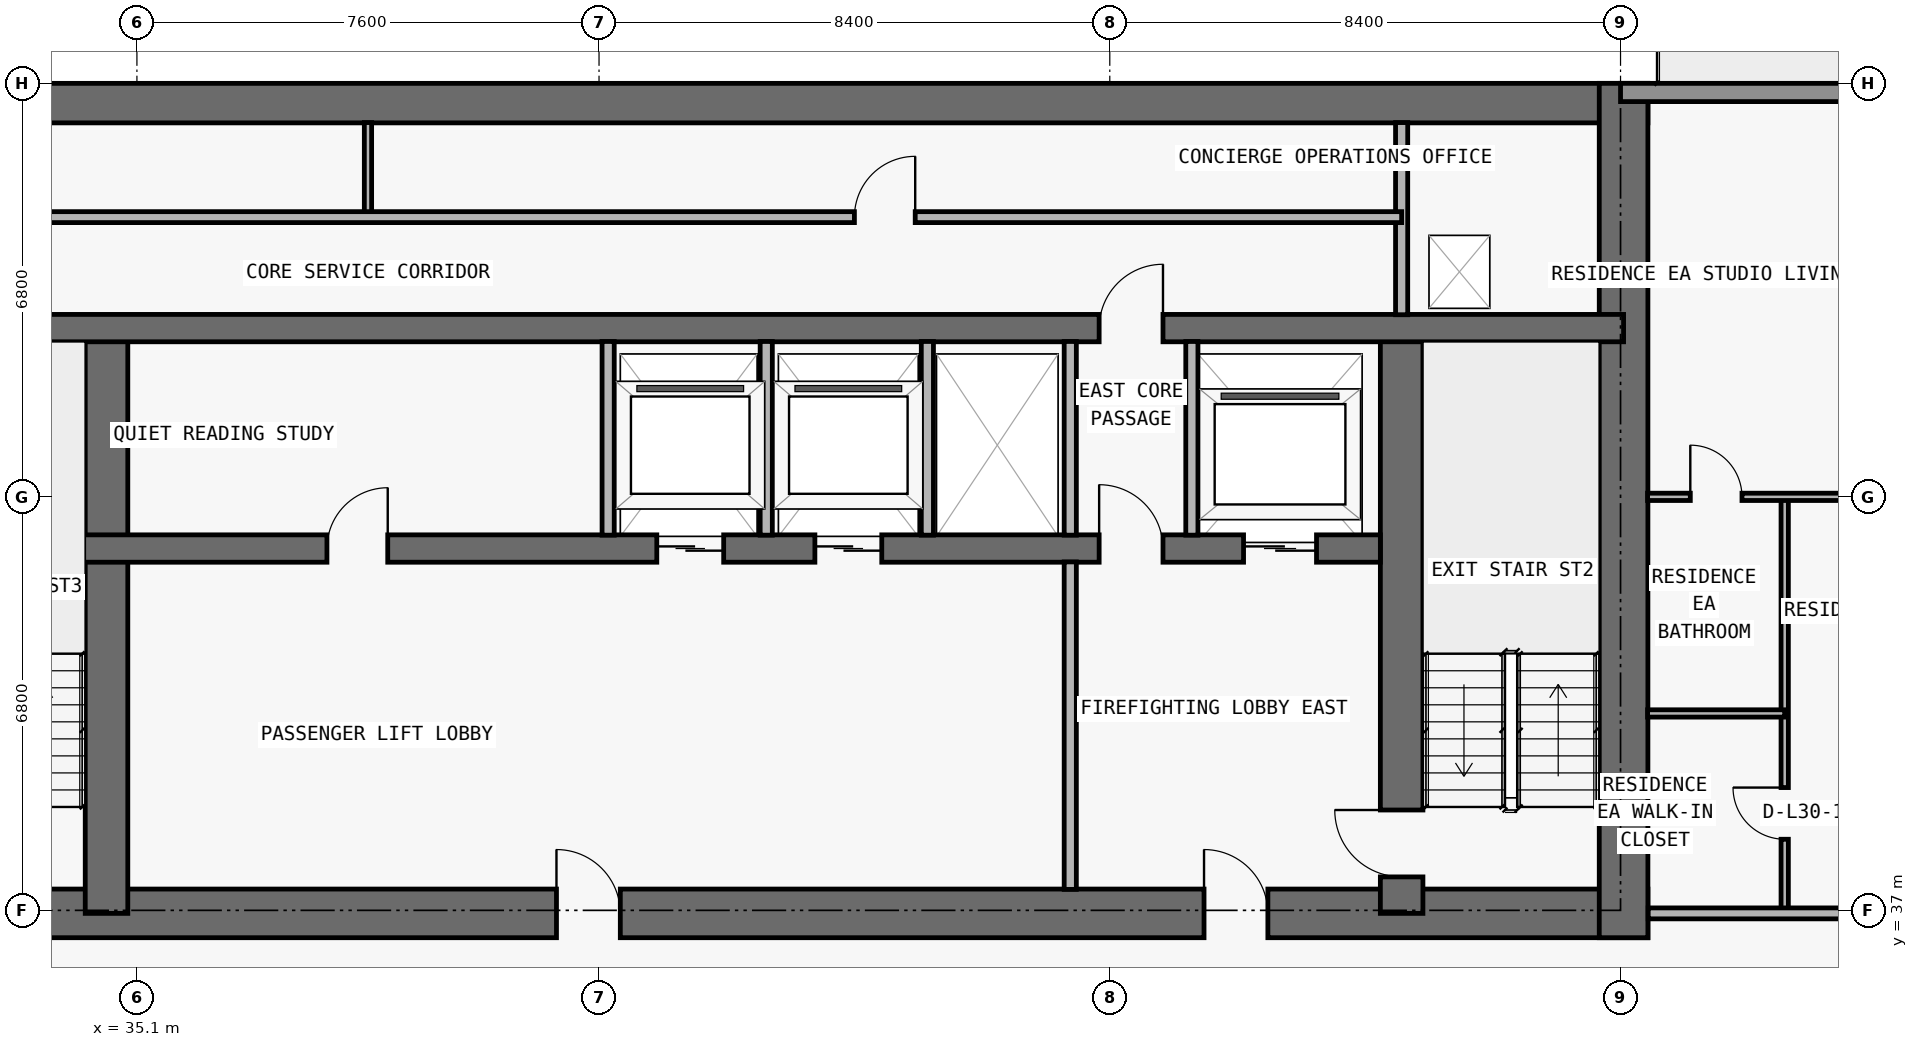
"""IFC4 building model, lengths in metres.
Left out: names, types, materials, properties, quantities, classifications, styles, units other than length and angle.
Written with IfcOpenShell. Run it as: python <this file> out.ifc"""

import sys

from ifc_helpers import new_model, si_unit, direction, frame, frame_2d, origin, place, context, subcontext, project, spatial, rectangle, extrude, element, fill, save


model = new_model("IFC4")
c1 = context("Model", 3, precision=1e-05, world=origin(), true_north=direction((0.0, 1.0)))
c2 = subcontext(c1, "Body", "Model", "MODEL_VIEW")
j1 = project(units=[si_unit("LENGTHUNIT", "METRE"), si_unit("PLANEANGLEUNIT", "RADIAN")], contexts=[c1])
p1 = place(None, origin())
s1 = spatial("IfcSite", under=j1, at=p1, CompositionType="ELEMENT")
p2 = place(p1, origin())
s2 = spatial("IfcBuilding", under=s1, at=p2, CompositionType="ELEMENT")
p3 = place(p2, frame((0.0, 0.0, 112.5)))
s3 = spatial("IfcBuildingStorey", under=s2, at=p3, CompositionType="ELEMENT", Elevation=112.5)
p4 = place(p3, frame((17.85, 36.95, 0.0), z_axis=(0.0, 0.0, 1.0), x_axis=(1.0, 0.0, 0.0)))
e1 = element("IfcWall", 1, at=p4, inside=s3, PredefinedType="SHEAR", context=c2, shape_type="SweptSolid", body=[
    extrude(rectangle(XDim=42.1, YDim=0.8, at=frame_2d((21.05, 0.0))), origin(), (0.0, 0.0, 1.0), 3.05),
])
p5 = place(p4, frame((14.45, 0.0, 0.0)))
e2 = element("IfcOpeningElement", 2, at=p5, cuts=e1, PredefinedType="OPENING", context=c2, shape_type="SweptSolid", body=[
    extrude(rectangle(XDim=1.1, YDim=2.15, at=frame_2d((0.55, 1.075))), frame((0.0, 0.41, 0.0), z_axis=(0.0, -1.0, 0.0), x_axis=(1.0, 0.0, 0.0)), (0.0, 0.0, 1.0), 0.82),
])
p6 = place(p4, frame((6.3, 0.0, 0.0)))
e3 = element("IfcOpeningElement", 3, at=p6, cuts=e1, PredefinedType="OPENING", context=c2, shape_type="SweptSolid", body=[
    extrude(rectangle(XDim=1.05, YDim=2.15, at=frame_2d((0.525, 1.075))), frame((0.0, 0.41, 0.0), z_axis=(0.0, -1.0, 0.0), x_axis=(1.0, 0.0, 0.0)), (0.0, 0.0, 1.0), 0.82),
])
p7 = place(p4, frame((34.8, 0.0, 0.0)))
e4 = element("IfcOpeningElement", 4, at=p7, cuts=e1, PredefinedType="OPENING", context=c2, shape_type="SweptSolid", body=[
    extrude(rectangle(XDim=1.05, YDim=2.15, at=frame_2d((0.525, 1.075))), frame((0.0, 0.41, 0.0), z_axis=(0.0, -1.0, 0.0), x_axis=(1.0, 0.0, 0.0)), (0.0, 0.0, 1.0), 0.82),
])
p8 = place(p4, frame((10.913, 0.0, 0.0)))
e5 = element("IfcOpeningElement", 5, at=p8, cuts=e1, PredefinedType="OPENING", context=c2, shape_type="SweptSolid", body=[
    extrude(rectangle(XDim=1.05, YDim=2.15, at=frame_2d((0.525, 1.075))), frame((0.0, 0.41, 0.0), z_axis=(0.0, -1.0, 0.0), x_axis=(1.0, 0.0, 0.0)), (0.0, 0.0, 1.0), 0.82),
])
p9 = place(p4, frame((24.15, 0.0, 0.0)))
e6 = element("IfcOpeningElement", 6, at=p9, cuts=e1, PredefinedType="OPENING", context=c2, shape_type="SweptSolid", body=[
    extrude(rectangle(XDim=1.05, YDim=2.15, at=frame_2d((0.525, 1.075))), frame((0.0, 0.41, 0.0), z_axis=(0.0, -1.0, 0.0), x_axis=(1.0, 0.0, 0.0)), (0.0, 0.0, 1.0), 0.82),
])
p10 = place(p3, frame((17.85, 50.275, 0.0), z_axis=(0.0, 0.0, 1.0), x_axis=(1.0, 0.0, 0.0)))
e7 = element("IfcWall", 7, at=p10, inside=s3, PredefinedType="SHEAR", context=c2, shape_type="SweptSolid", body=[
    extrude(rectangle(XDim=42.1, YDim=0.65, at=frame_2d((21.05, 0.0))), origin(), (0.0, 0.0, 1.0), 3.05),
])
p11 = place(p3, frame((59.55, 36.55, 0.0), z_axis=(0.0, 0.0, 1.0), x_axis=(0.0, 1.0, 0.0)))
e8 = element("IfcWall", 8, at=p11, inside=s3, PredefinedType="SHEAR", context=c2, shape_type="SweptSolid", body=[
    extrude(rectangle(XDim=14.05, YDim=0.8, at=frame_2d((7.025, 0.0))), origin(), (0.0, 0.0, 1.0), 3.05),
])
p12 = place(p3, frame((55.9, 36.95, 0.0), z_axis=(0.0, 0.0, 1.0), x_axis=(0.0, 1.0, 0.0)))
e9 = element("IfcWall", 9, at=p12, inside=s3, PredefinedType="SHEAR", context=c2, shape_type="SweptSolid", body=[
    extrude(rectangle(XDim=9.625, YDim=0.7, at=frame_2d((4.812, 0.0))), origin(), (0.0, 0.0, 1.0), 3.05),
])
p13 = place(p12, frame((0.6, 0.0, 0.0)))
e10 = element("IfcOpeningElement", 10, at=p13, cuts=e9, PredefinedType="OPENING", context=c2, shape_type="SweptSolid", body=[
    extrude(rectangle(XDim=1.1, YDim=2.15, at=frame_2d((0.55, 1.075))), frame((0.0, 0.36, 0.0), z_axis=(0.0, -1.0, 0.0), x_axis=(1.0, 0.0, 0.0)), (0.0, 0.0, 1.0), 0.72),
])
p14 = place(p3, frame((34.6, 36.95, 0.0), z_axis=(0.0, 0.0, 1.0), x_axis=(0.0, 1.0, 0.0)))
e11 = element("IfcWall", 11, at=p14, inside=s3, PredefinedType="SHEAR", context=c2, shape_type="SweptSolid", body=[
    extrude(rectangle(XDim=9.625, YDim=0.7, at=frame_2d((4.812, 0.0))), origin(), (0.0, 0.0, 1.0), 3.05),
])
p15 = place(p3, frame((22.25, 42.95, 0.0), z_axis=(0.0, 0.0, 1.0), x_axis=(1.0, 0.0, 0.0)))
e12 = element("IfcWall", 12, at=p15, inside=s3, PredefinedType="SHEAR", context=c2, shape_type="SweptSolid", body=[
    extrude(rectangle(XDim=33.3, YDim=0.45, at=frame_2d((16.65, 0.0))), origin(), (0.0, 0.0, 1.0), 3.05),
])
p16 = place(p15, frame((1.05, 0.0, 0.0)))
e13 = element("IfcOpeningElement", 13, at=p16, cuts=e12, PredefinedType="OPENING", context=c2, shape_type="SweptSolid", body=[
    extrude(rectangle(XDim=1.2, YDim=2.2, at=frame_2d((0.6, 1.1))), frame((0.0, 0.235, 0.0), z_axis=(0.0, -1.0, 0.0), x_axis=(1.0, 0.0, 0.0)), (0.0, 0.0, 1.0), 0.47),
])
p17 = place(p15, frame((31.05, 0.0, 0.0)))
e14 = element("IfcOpeningElement", 14, at=p17, cuts=e12, PredefinedType="OPENING", context=c2, shape_type="SweptSolid", body=[
    extrude(rectangle(XDim=1.2, YDim=2.2, at=frame_2d((0.6, 1.1))), frame((0.0, 0.235, 0.0), z_axis=(0.0, -1.0, 0.0), x_axis=(1.0, 0.0, 0.0)), (0.0, 0.0, 1.0), 0.47),
])
p18 = place(p15, frame((21.4, 0.0, 0.0)))
e15 = element("IfcOpeningElement", 15, at=p18, cuts=e12, PredefinedType="OPENING", context=c2, shape_type="SweptSolid", body=[
    extrude(rectangle(XDim=1.1, YDim=2.2, at=frame_2d((0.55, 1.1))), frame((0.0, 0.235, 0.0), z_axis=(0.0, -1.0, 0.0), x_axis=(1.0, 0.0, 0.0)), (0.0, 0.0, 1.0), 0.47),
])
p19 = place(p15, frame((24.0, 0.0, 0.0)))
e16 = element("IfcOpeningElement", 16, at=p19, cuts=e12, PredefinedType="OPENING", context=c2, shape_type="SweptSolid", body=[
    extrude(rectangle(XDim=1.1, YDim=2.2, at=frame_2d((0.55, 1.1))), frame((0.0, 0.235, 0.0), z_axis=(0.0, -1.0, 0.0), x_axis=(1.0, 0.0, 0.0)), (0.0, 0.0, 1.0), 0.47),
])
p20 = place(p15, frame((3.625, 0.0, 0.0)))
e17 = element("IfcOpeningElement", 17, at=p20, cuts=e12, PredefinedType="OPENING", context=c2, shape_type="SweptSolid", body=[
    extrude(rectangle(XDim=1.05, YDim=2.15, at=frame_2d((0.525, 1.075))), frame((0.0, 0.235, 0.0), z_axis=(0.0, -1.0, 0.0), x_axis=(1.0, 0.0, 0.0)), (0.0, 0.0, 1.0), 0.47),
])
p21 = place(p15, frame((28.675, 0.0, 0.0)))
e18 = element("IfcOpeningElement", 18, at=p21, cuts=e12, PredefinedType="OPENING", context=c2, shape_type="SweptSolid", body=[
    extrude(rectangle(XDim=1.05, YDim=2.15, at=frame_2d((0.525, 1.075))), frame((0.0, 0.235, 0.0), z_axis=(0.0, -1.0, 0.0), x_axis=(1.0, 0.0, 0.0)), (0.0, 0.0, 1.0), 0.47),
])
p22 = place(p15, frame((15.975, 0.0, 0.0)))
e19 = element("IfcOpeningElement", 19, at=p22, cuts=e12, PredefinedType="OPENING", context=c2, shape_type="SweptSolid", body=[
    extrude(rectangle(XDim=1.0, YDim=2.2, at=frame_2d((0.5, 1.1))), frame((0.0, 0.235, 0.0), z_axis=(0.0, -1.0, 0.0), x_axis=(1.0, 0.0, 0.0)), (0.0, 0.0, 1.0), 0.47),
])
p23 = place(p3, frame((18.25, 46.575, 0.0), z_axis=(0.0, 0.0, 1.0), x_axis=(1.0, 0.0, 0.0)))
e20 = element("IfcWall", 20, at=p23, inside=s3, PredefinedType="SHEAR", context=c2, shape_type="SweptSolid", body=[
    extrude(rectangle(XDim=41.3, YDim=0.45, at=frame_2d((20.65, 0.0))), origin(), (0.0, 0.0, 1.0), 3.05),
])
p24 = place(p23, frame((7.625, 0.0, 0.0)))
e21 = element("IfcOpeningElement", 21, at=p24, cuts=e20, PredefinedType="OPENING", context=c2, shape_type="SweptSolid", body=[
    extrude(rectangle(XDim=1.05, YDim=2.15, at=frame_2d((0.525, 1.075))), frame((0.0, 0.235, 0.0), z_axis=(0.0, -1.0, 0.0), x_axis=(1.0, 0.0, 0.0)), (0.0, 0.0, 1.0), 0.47),
])
p25 = place(p23, frame((32.675, 0.0, 0.0)))
e22 = element("IfcOpeningElement", 22, at=p25, cuts=e20, PredefinedType="OPENING", context=c2, shape_type="SweptSolid", body=[
    extrude(rectangle(XDim=1.05, YDim=2.15, at=frame_2d((0.525, 1.075))), frame((0.0, 0.235, 0.0), z_axis=(0.0, -1.0, 0.0), x_axis=(1.0, 0.0, 0.0)), (0.0, 0.0, 1.0), 0.47),
])
p26 = place(p3, frame((59.5, 50.45, 0.0), z_axis=(0.0, 0.0, 1.0), x_axis=(1.0, 0.0, 0.0)))
e23 = element("IfcWall", 23, at=p26, inside=s3, PredefinedType="STANDARD", context=c2, shape_type="SweptSolid", body=[
    extrude(rectangle(XDim=10.6, YDim=0.3, at=frame_2d((5.3, 0.0))), origin(), (0.0, 0.0, 1.0), 3.05),
])
p27 = place(p26, frame((4.3, 0.0, 0.0)))
e24 = element("IfcOpeningElement", 24, at=p27, cuts=e23, PredefinedType="OPENING", context=c2, shape_type="SweptSolid", body=[
    extrude(rectangle(XDim=2.0, YDim=2.3, at=frame_2d((1.0, 1.15))), frame((0.0, 0.16, 0.0), z_axis=(0.0, -1.0, 0.0), x_axis=(1.0, 0.0, 0.0)), (0.0, 0.0, 1.0), 0.32),
])
p28 = place(p3, frame((38.9, 48.4, 0.0), z_axis=(0.0, 0.0, 1.0), x_axis=(0.0, 1.0, 0.0)))
e25 = element("IfcWall", 25, at=p28, inside=s3, PredefinedType="PARTITIONING", context=c2, shape_type="SweptSolid", body=[
    extrude(rectangle(XDim=1.555, YDim=0.12, at=frame_2d((0.778, 0.0))), origin(), (0.0, 0.0, 1.0), 3.05),
])
for number, where, z_axis, x_axis in (
    (26, (42.85, 43.17, 0.0), (0.0, 0.0, 1.0), (0.0, 1.0, 0.0)),
    (27, (45.45, 43.17, 0.0), (0.0, 0.0, 1.0), (0.0, 1.0, 0.0)),
    (28, (48.1, 43.17, 0.0), (0.0, 0.0, 1.0), (0.0, 1.0, 0.0)),
):
    element("IfcWall", number, at=place(p3, frame(where, z_axis=z_axis, x_axis=x_axis)), inside=s3, PredefinedType="PARTITIONING", context=c2, shape_type="SweptSolid", body=[
        extrude(rectangle(XDim=3.185, YDim=0.2, at=frame_2d((1.593, 0.0))), origin(), (0.0, 0.0, 1.0), 3.05),
    ])
p29 = place(p3, frame((50.45, 37.345, 0.0), z_axis=(0.0, 0.0, 1.0), x_axis=(0.0, 1.0, 0.0)))
e29 = element("IfcWall", 29, at=p29, inside=s3, PredefinedType="PARTITIONING", context=c2, shape_type="SweptSolid", body=[
    extrude(rectangle(XDim=5.385, YDim=0.2, at=frame_2d((2.692, 0.0))), origin(), (0.0, 0.0, 1.0), 3.05),
])
for number, where, z_axis, x_axis in (
    (30, (50.45, 43.17, 0.0), (0.0, 0.0, 1.0), (0.0, 1.0, 0.0)),
    (31, (52.45, 43.17, 0.0), (0.0, 0.0, 1.0), (0.0, 1.0, 0.0)),
):
    element("IfcWall", number, at=place(p3, frame(where, z_axis=z_axis, x_axis=x_axis)), inside=s3, PredefinedType="PARTITIONING", context=c2, shape_type="SweptSolid", body=[
        extrude(rectangle(XDim=3.185, YDim=0.2, at=frame_2d((1.593, 0.0))), origin(), (0.0, 0.0, 1.0), 3.05),
    ])
p30 = place(p3, frame((55.9, 46.795, 0.0), z_axis=(0.0, 0.0, 1.0), x_axis=(0.0, 1.0, 0.0)))
e32 = element("IfcWall", 32, at=p30, inside=s3, PredefinedType="PARTITIONING", context=c2, shape_type="SweptSolid", body=[
    extrude(rectangle(XDim=3.16, YDim=0.2, at=frame_2d((1.58, 0.0))), origin(), (0.0, 0.0, 1.0), 3.05),
])
p31 = place(p3, frame((62.2, 36.95, 0.0), z_axis=(0.0, 0.0, 1.0), x_axis=(0.0, 1.0, 0.0)))
e33 = element("IfcWall", 33, at=p31, inside=s3, PredefinedType="PARTITIONING", context=c2, shape_type="SweptSolid", body=[
    extrude(rectangle(XDim=6.85, YDim=0.12, at=frame_2d((3.425, 0.0))), origin(), (0.0, 0.0, 1.0), 3.05),
])
p32 = place(p31, frame((1.219, 0.0, 0.0)))
e34 = element("IfcOpeningElement", 34, at=p32, cuts=e33, PredefinedType="OPENING", context=c2, shape_type="SweptSolid", body=[
    extrude(rectangle(XDim=0.85, YDim=2.1, at=frame_2d((0.425, 1.05))), frame((0.0, 0.07, 0.0), z_axis=(0.0, -1.0, 0.0), x_axis=(1.0, 0.0, 0.0)), (0.0, 0.0, 1.0), 0.14),
])
p33 = place(p3, frame((59.955, 36.95, 0.0), z_axis=(0.0, 0.0, 1.0), x_axis=(1.0, 0.0, 0.0)))
e35 = element("IfcWall", 35, at=p33, inside=s3, PredefinedType="PARTITIONING", context=c2, shape_type="SweptSolid", body=[
    extrude(rectangle(XDim=10.145, YDim=0.18, at=frame_2d((5.073, 0.0))), origin(), (0.0, 0.0, 1.0), 3.05),
])
p34 = place(p33, frame((3.957, 0.0, 0.0)))
e36 = element("IfcOpeningElement", 36, at=p34, cuts=e35, PredefinedType="OPENING", context=c2, shape_type="SweptSolid", body=[
    extrude(rectangle(XDim=1.0, YDim=2.2, at=frame_2d((0.5, 1.1))), frame((0.0, 0.1, 0.0), z_axis=(0.0, -1.0, 0.0), x_axis=(1.0, 0.0, 0.0)), (0.0, 0.0, 1.0), 0.2),
])
p35 = place(p3, frame((59.945, 40.238, 0.0), z_axis=(0.0, 0.0, 1.0), x_axis=(1.0, 0.0, 0.0)))
e37 = element("IfcWall", 37, at=p35, inside=s3, PredefinedType="PARTITIONING", context=c2, shape_type="SweptSolid", body=[
    extrude(rectangle(XDim=2.255, YDim=0.12, at=frame_2d((1.127, 0.0))), origin(), (0.0, 0.0, 1.0), 3.05),
])
p36 = place(p3, frame((59.945, 43.8, 0.0), z_axis=(0.0, 0.0, 1.0), x_axis=(1.0, 0.0, 0.0)))
e38 = element("IfcWall", 38, at=p36, inside=s3, PredefinedType="PARTITIONING", context=c2, shape_type="SweptSolid", body=[
    extrude(rectangle(XDim=13.66, YDim=0.12, at=frame_2d((6.83, 0.0))), origin(), (0.0, 0.0, 1.0), 2.339),
])
p37 = place(p36, frame((4.017, 0.0, 0.0)))
e39 = element("IfcOpeningElement", 39, at=p37, cuts=e38, PredefinedType="OPENING", context=c2, shape_type="SweptSolid", body=[
    extrude(rectangle(XDim=0.9, YDim=2.15, at=frame_2d((0.45, 1.075))), frame((0.0, 0.07, 0.0), z_axis=(0.0, -1.0, 0.0), x_axis=(1.0, 0.0, 0.0)), (0.0, 0.0, 1.0), 0.14),
])
p38 = place(p36, frame((0.702, 0.0, 0.0)))
e40 = element("IfcOpeningElement", 40, at=p38, cuts=e38, PredefinedType="OPENING", context=c2, shape_type="SweptSolid", body=[
    extrude(rectangle(XDim=0.85, YDim=2.1, at=frame_2d((0.425, 1.05))), frame((0.0, 0.07, 0.0), z_axis=(0.0, -1.0, 0.0), x_axis=(1.0, 0.0, 0.0)), (0.0, 0.0, 1.0), 0.14),
])
p39 = place(p3, frame((21.9, 48.4, 0.0), z_axis=(0.0, 0.0, 1.0), x_axis=(1.0, 0.0, 0.0)))
e41 = element("IfcWall", 41, at=p39, inside=s3, PredefinedType="PARTITIONING", context=c2, shape_type="SweptSolid", body=[
    extrude(rectangle(XDim=34.0, YDim=0.18, at=frame_2d((17.0, 0.0))), origin(), (0.0, 0.0, 1.0), 3.05),
])
p40 = place(p39, frame((8.0, 0.0, 0.0)))
e42 = element("IfcOpeningElement", 42, at=p40, cuts=e41, PredefinedType="OPENING", context=c2, shape_type="SweptSolid", body=[
    extrude(rectangle(XDim=1.0, YDim=2.2, at=frame_2d((0.5, 1.1))), frame((0.0, 0.1, 0.0), z_axis=(0.0, -1.0, 0.0), x_axis=(1.0, 0.0, 0.0)), (0.0, 0.0, 1.0), 0.2),
])
p41 = place(p39, frame((25.0, 0.0, 0.0)))
e43 = element("IfcOpeningElement", 43, at=p41, cuts=e41, PredefinedType="OPENING", context=c2, shape_type="SweptSolid", body=[
    extrude(rectangle(XDim=1.0, YDim=2.2, at=frame_2d((0.5, 1.1))), frame((0.0, 0.1, 0.0), z_axis=(0.0, -1.0, 0.0), x_axis=(1.0, 0.0, 0.0)), (0.0, 0.0, 1.0), 0.2),
])
p42 = place(p17, origin())
e44 = element("IfcDoor", 44, at=p42, inside=s3, OperationType="DOUBLE_DOOR_SLIDING", PredefinedType="DOOR", context=c2, shape_type="SweptSolid", body=[
    extrude(rectangle(XDim=1.2, YDim=2.2, at=frame_2d((0.6, 1.1))), frame((0.0, 0.025, 0.0), z_axis=(0.0, -1.0, 0.0), x_axis=(1.0, 0.0, 0.0)), (0.0, 0.0, 1.0), 0.05),
])
fill(e14, e44)
p43 = place(p18, origin())
e45 = element("IfcDoor", 45, at=p43, inside=s3, OperationType="DOUBLE_DOOR_SLIDING", PredefinedType="DOOR", context=c2, shape_type="SweptSolid", body=[
    extrude(rectangle(XDim=1.1, YDim=2.2, at=frame_2d((0.55, 1.1))), frame((0.0, 0.025, 0.0), z_axis=(0.0, -1.0, 0.0), x_axis=(1.0, 0.0, 0.0)), (0.0, 0.0, 1.0), 0.05),
])
fill(e15, e45)
p44 = place(p19, origin())
e46 = element("IfcDoor", 46, at=p44, inside=s3, OperationType="DOUBLE_DOOR_SLIDING", PredefinedType="DOOR", context=c2, shape_type="SweptSolid", body=[
    extrude(rectangle(XDim=1.1, YDim=2.2, at=frame_2d((0.55, 1.1))), frame((0.0, 0.025, 0.0), z_axis=(0.0, -1.0, 0.0), x_axis=(1.0, 0.0, 0.0)), (0.0, 0.0, 1.0), 0.05),
])
fill(e16, e46)
p45 = place(p7, origin())
e47 = element("IfcDoor", 47, at=p45, inside=s3, OperationType="SINGLE_SWING_LEFT", PredefinedType="DOOR", context=c2, shape_type="SweptSolid", body=[
    extrude(rectangle(XDim=1.05, YDim=2.15, at=frame_2d((0.525, 1.075))), frame((0.0, 0.025, 0.0), z_axis=(0.0, -1.0, 0.0), x_axis=(1.0, 0.0, 0.0)), (0.0, 0.0, 1.0), 0.05),
])
fill(e4, e47)
p46 = place(p13, origin())
e48 = element("IfcDoor", 48, at=p46, inside=s3, OperationType="SINGLE_SWING_RIGHT", PredefinedType="DOOR", context=c2, shape_type="SweptSolid", body=[
    extrude(rectangle(XDim=1.1, YDim=2.15, at=frame_2d((0.55, 1.075))), frame((0.0, 0.025, 0.0), z_axis=(0.0, -1.0, 0.0), x_axis=(1.0, 0.0, 0.0)), (0.0, 0.0, 1.0), 0.05),
])
fill(e10, e48)
p47 = place(p21, origin())
e49 = element("IfcDoor", 49, at=p47, inside=s3, OperationType="SINGLE_SWING_LEFT", PredefinedType="DOOR", context=c2, shape_type="SweptSolid", body=[
    extrude(rectangle(XDim=1.05, YDim=2.15, at=frame_2d((0.525, 1.075))), frame((0.0, 0.025, 0.0), z_axis=(0.0, -1.0, 0.0), x_axis=(1.0, 0.0, 0.0)), (0.0, 0.0, 1.0), 0.05),
])
fill(e18, e49)
p48 = place(p9, origin())
e50 = element("IfcDoor", 50, at=p48, inside=s3, OperationType="SINGLE_SWING_LEFT", PredefinedType="DOOR", context=c2, shape_type="SweptSolid", body=[
    extrude(rectangle(XDim=1.05, YDim=2.15, at=frame_2d((0.525, 1.075))), frame((0.0, 0.025, 0.0), z_axis=(0.0, -1.0, 0.0), x_axis=(1.0, 0.0, 0.0)), (0.0, 0.0, 1.0), 0.05),
])
fill(e6, e50)
p49 = place(p22, origin())
e51 = element("IfcDoor", 51, at=p49, inside=s3, OperationType="SINGLE_SWING_RIGHT", PredefinedType="DOOR", context=c2, shape_type="SweptSolid", body=[
    extrude(rectangle(XDim=1.0, YDim=2.2, at=frame_2d((0.5, 1.1))), frame((0.0, 0.025, 0.0), z_axis=(0.0, -1.0, 0.0), x_axis=(1.0, 0.0, 0.0)), (0.0, 0.0, 1.0), 0.05),
])
fill(e19, e51)
p50 = place(p25, origin())
e52 = element("IfcDoor", 52, at=p50, inside=s3, OperationType="SINGLE_SWING_RIGHT", PredefinedType="DOOR", context=c2, shape_type="SweptSolid", body=[
    extrude(rectangle(XDim=1.05, YDim=2.15, at=frame_2d((0.525, 1.075))), frame((0.0, 0.025, 0.0), z_axis=(0.0, -1.0, 0.0), x_axis=(1.0, 0.0, 0.0)), (0.0, 0.0, 1.0), 0.05),
])
fill(e22, e52)
p51 = place(p41, origin())
e53 = element("IfcDoor", 53, at=p51, inside=s3, OperationType="SINGLE_SWING_RIGHT", PredefinedType="DOOR", context=c2, shape_type="SweptSolid", body=[
    extrude(rectangle(XDim=1.0, YDim=2.2, at=frame_2d((0.5, 1.1))), frame((0.0, 0.025, 0.0), z_axis=(0.0, -1.0, 0.0), x_axis=(1.0, 0.0, 0.0)), (0.0, 0.0, 1.0), 0.05),
])
fill(e43, e53)
p52 = place(p32, origin())
e54 = element("IfcDoor", 54, at=p52, inside=s3, OperationType="SINGLE_SWING_RIGHT", PredefinedType="DOOR", context=c2, shape_type="SweptSolid", body=[
    extrude(rectangle(XDim=0.85, YDim=2.1, at=frame_2d((0.425, 1.05))), frame((0.0, 0.025, 0.0), z_axis=(0.0, -1.0, 0.0), x_axis=(1.0, 0.0, 0.0)), (0.0, 0.0, 1.0), 0.05),
])
fill(e34, e54)
p53 = place(p38, origin())
e55 = element("IfcDoor", 55, at=p53, inside=s3, OperationType="SINGLE_SWING_LEFT", PredefinedType="DOOR", context=c2, shape_type="SweptSolid", body=[
    extrude(rectangle(XDim=0.85, YDim=2.1, at=frame_2d((0.425, 1.05))), frame((0.0, 0.025, 0.0), z_axis=(0.0, -1.0, 0.0), x_axis=(1.0, 0.0, 0.0)), (0.0, 0.0, 1.0), 0.05),
])
fill(e40, e55)
save(model, sys.argv[1])
